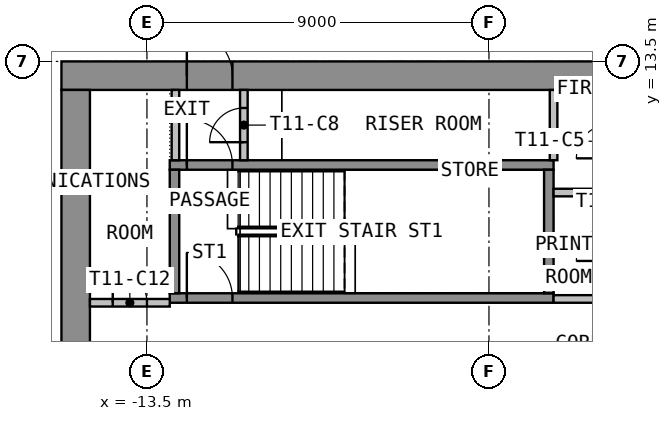
"""IFC4 building model, lengths in metres.
Left out: names, types, materials, properties, quantities, classifications, styles, units other than length and angle.
Written with IfcOpenShell. Run it as: python <this file> out.ifc"""

import sys

from ifc_helpers import new_model, si_unit, direction, frame, frame_2d, origin, place, context, subcontext, project, spatial, rectangle, extrude, element, fill, save


model = new_model("IFC4")
c1 = context("Model", 3, precision=1e-05, world=origin(), true_north=direction((0.0, 1.0)))
c2 = subcontext(c1, "Body", "Model", "MODEL_VIEW")
j1 = project(units=[si_unit("LENGTHUNIT", "METRE"), si_unit("PLANEANGLEUNIT", "RADIAN")], contexts=[c1])
p1 = place(None, origin())
s1 = spatial("IfcSite", under=j1, at=p1, CompositionType="ELEMENT")
p2 = place(p1, origin())
s2 = spatial("IfcBuilding", under=s1, at=p2, CompositionType="ELEMENT")
p3 = place(p2, frame((0.0, 0.0, 156.0)))
s3 = spatial("IfcBuildingStorey", under=s2, at=p3, CompositionType="ELEMENT", Elevation=156.0)
p4 = place(p3, frame((-15.75, 13.125, 0.0), z_axis=(0.0, 0.0, 1.0), x_axis=(1.0, 0.0, 0.0)))
e1 = element("IfcWall", 1, at=p4, inside=s3, PredefinedType="SHEAR", context=c2, shape_type="SweptSolid", body=[
    extrude(rectangle(XDim=31.5, YDim=0.75, at=frame_2d((15.75, 0.0))), origin(), (0.0, 0.0, 1.0), 3.575),
])
p5 = place(p4, frame((14.55, 0.0, 0.0)))
e2 = element("IfcOpeningElement", 2, at=p5, cuts=e1, PredefinedType="OPENING", context=c2, shape_type="SweptSolid", body=[
    extrude(rectangle(XDim=2.4, YDim=2.1, at=frame_2d((1.2, 1.05))), frame((0.0, 0.385, 0.0), z_axis=(0.0, -1.0, 0.0), x_axis=(1.0, 0.0, 0.0)), (0.0, 0.0, 1.0), 0.77),
])
p6 = place(p4, frame((3.3, 0.0, 0.0)))
e3 = element("IfcOpeningElement", 3, at=p6, cuts=e1, PredefinedType="OPENING", context=c2, shape_type="SweptSolid", body=[
    extrude(rectangle(XDim=1.2, YDim=2.1, at=frame_2d((0.6, 1.05))), frame((0.0, 0.385, 0.0), z_axis=(0.0, -1.0, 0.0), x_axis=(1.0, 0.0, 0.0)), (0.0, 0.0, 1.0), 0.77),
])
p7 = place(p4, frame((27.0, 0.0, 0.0)))
e4 = element("IfcOpeningElement", 4, at=p7, cuts=e1, PredefinedType="OPENING", context=c2, shape_type="SweptSolid", body=[
    extrude(rectangle(XDim=1.2, YDim=2.1, at=frame_2d((0.6, 1.05))), frame((0.0, 0.385, 0.0), z_axis=(0.0, -1.0, 0.0), x_axis=(1.0, 0.0, 0.0)), (0.0, 0.0, 1.0), 0.77),
])
p8 = place(p3, frame((-15.375, -12.75, 0.0), z_axis=(0.0, 0.0, 1.0), x_axis=(0.0, 1.0, 0.0)))
e5 = element("IfcWall", 5, at=p8, inside=s3, PredefinedType="SHEAR", context=c2, shape_type="SweptSolid", body=[
    extrude(rectangle(XDim=25.5, YDim=0.75, at=frame_2d((12.75, 0.0))), origin(), (0.0, 0.0, 1.0), 3.575),
])
p9 = place(p8, frame((11.55, 0.0, 0.0)))
e6 = element("IfcOpeningElement", 6, at=p9, cuts=e5, PredefinedType="OPENING", context=c2, shape_type="SweptSolid", body=[
    extrude(rectangle(XDim=2.4, YDim=2.1, at=frame_2d((1.2, 1.05))), frame((0.0, 0.385, 0.0), z_axis=(0.0, -1.0, 0.0), x_axis=(1.0, 0.0, 0.0)), (0.0, 0.0, 1.0), 0.77),
])
p10 = place(p3, frame((-12.9, 7.275, 0.0), z_axis=(0.0, 0.0, 1.0), x_axis=(1.0, 0.0, 0.0)))
e7 = element("IfcWall", 7, at=p10, inside=s3, PredefinedType="SHEAR", context=c2, shape_type="SweptSolid", body=[
    extrude(rectangle(XDim=10.1, YDim=0.25, at=frame_2d((5.05, 0.0))), origin(), (0.0, 0.0, 1.0), 3.575),
])
p11 = place(p10, frame((0.45, 0.0, 0.0)))
e8 = element("IfcOpeningElement", 8, at=p11, cuts=e7, PredefinedType="OPENING", context=c2, shape_type="SweptSolid", body=[
    extrude(rectangle(XDim=1.2, YDim=2.1, at=frame_2d((0.6, 1.05))), frame((0.0, 0.135, 0.0), z_axis=(0.0, -1.0, 0.0), x_axis=(1.0, 0.0, 0.0)), (0.0, 0.0, 1.0), 0.27),
])
p12 = place(p3, frame((-12.9, 10.775, 0.0), z_axis=(0.0, 0.0, 1.0), x_axis=(1.0, 0.0, 0.0)))
e9 = element("IfcWall", 9, at=p12, inside=s3, PredefinedType="SHEAR", context=c2, shape_type="SweptSolid", body=[
    extrude(rectangle(XDim=10.1, YDim=0.25, at=frame_2d((5.05, 0.0))), origin(), (0.0, 0.0, 1.0), 3.575),
])
p13 = place(p12, frame((0.45, 0.0, 0.0)))
e10 = element("IfcOpeningElement", 10, at=p13, cuts=e9, PredefinedType="OPENING", context=c2, shape_type="SweptSolid", body=[
    extrude(rectangle(XDim=1.2, YDim=2.1, at=frame_2d((0.6, 1.05))), frame((0.0, 0.135, 0.0), z_axis=(0.0, -1.0, 0.0), x_axis=(1.0, 0.0, 0.0)), (0.0, 0.0, 1.0), 0.27),
])
for number, where, z_axis, x_axis in (
    (11, (-12.775, 7.4, 0.0), (0.0, 0.0, 1.0), (0.0, 1.0, 0.0)),
    (12, (-2.925, 7.4, 0.0), (0.0, 0.0, 1.0), (0.0, 1.0, 0.0)),
):
    element("IfcWall", number, at=place(p3, frame(where, z_axis=z_axis, x_axis=x_axis)), inside=s3, PredefinedType="SHEAR", context=c2, shape_type="SweptSolid", body=[
        extrude(rectangle(XDim=3.25, YDim=0.25, at=frame_2d((1.625, 0.0))), origin(), (0.0, 0.0, 1.0), 3.575),
    ])
for number, where, z_axis, x_axis in (
    (13, (-2.8, 7.25, 0.0), (0.0, 0.0, 1.0), (1.0, 0.0, 0.0)),
    (14, (-2.8, 10.05, 0.0), (0.0, 0.0, 1.0), (1.0, 0.0, 0.0)),
):
    element("IfcWall", number, at=place(p3, frame(where, z_axis=z_axis, x_axis=x_axis)), inside=s3, PredefinedType="PARTITIONING", context=c2, shape_type="SweptSolid", body=[
        extrude(rectangle(XDim=1.4, YDim=0.2, at=frame_2d((0.7, 0.0))), origin(), (0.0, 0.0, 1.0), 3.575),
    ])
p14 = place(p3, frame((-12.75, 10.9, 0.0), z_axis=(0.0, 0.0, 1.0), x_axis=(0.0, 1.0, 0.0)))
e15 = element("IfcWall", 15, at=p14, inside=s3, PredefinedType="PARTITIONING", context=c2, shape_type="SweptSolid", body=[
    extrude(rectangle(XDim=1.85, YDim=0.2, at=frame_2d((0.925, 0.0))), origin(), (0.0, 0.0, 1.0), 3.575),
])
p15 = place(p3, frame((-10.95, 10.9, 0.0), z_axis=(0.0, 0.0, 1.0), x_axis=(0.0, 1.0, 0.0)))
e16 = element("IfcWall", 16, at=p15, inside=s3, PredefinedType="PARTITIONING", context=c2, shape_type="SweptSolid", body=[
    extrude(rectangle(XDim=1.85, YDim=0.2, at=frame_2d((0.925, 0.0))), origin(), (0.0, 0.0, 1.0), 3.575),
])
p16 = place(p15, frame((0.475, 0.0, 0.0)))
e17 = element("IfcOpeningElement", 17, at=p16, cuts=e16, PredefinedType="OPENING", context=c2, shape_type="SweptSolid", body=[
    extrude(rectangle(XDim=0.9, YDim=2.1, at=frame_2d((0.45, 1.05))), frame((0.0, 0.11, 0.0), z_axis=(0.0, -1.0, 0.0), x_axis=(1.0, 0.0, 0.0)), (0.0, 0.0, 1.0), 0.22),
])
p17 = place(p3, frame((-15.0, 7.15, 0.0), z_axis=(0.0, 0.0, 1.0), x_axis=(1.0, 0.0, 0.0)))
e18 = element("IfcWall", 18, at=p17, inside=s3, PredefinedType="PARTITIONING", context=c2, shape_type="SweptSolid", body=[
    extrude(rectangle(XDim=2.1, YDim=0.2, at=frame_2d((1.05, 0.0))), origin(), (0.0, 0.0, 1.0), 3.575),
])
p18 = place(p17, frame((0.6, 0.0, 0.0)))
e19 = element("IfcOpeningElement", 19, at=p18, cuts=e18, PredefinedType="OPENING", context=c2, shape_type="SweptSolid", body=[
    extrude(rectangle(XDim=0.9, YDim=2.1, at=frame_2d((0.45, 1.05))), frame((0.0, 0.11, 0.0), z_axis=(0.0, -1.0, 0.0), x_axis=(1.0, 0.0, 0.0)), (0.0, 0.0, 1.0), 0.22),
])
p19 = place(p3, frame((-2.8, 10.901, 0.0), z_axis=(0.0, 0.0, 1.0), x_axis=(0.0, 1.0, 0.0)))
e20 = element("IfcWall", 20, at=p19, inside=s3, PredefinedType="PARTITIONING", context=c2, shape_type="SweptSolid", body=[
    extrude(rectangle(XDim=1.848, YDim=0.2, at=frame_2d((0.924, 0.0))), origin(), (0.0, 0.0, 1.0), 3.575),
])
p20 = place(p6, origin())
e21 = element("IfcDoor", 21, at=p20, inside=s3, OperationType="SINGLE_SWING_RIGHT", PredefinedType="DOOR", context=c2, shape_type="SweptSolid", body=[
    extrude(rectangle(XDim=1.2, YDim=2.1, at=frame_2d((0.6, 1.05))), frame((0.0, 0.025, 0.0), z_axis=(0.0, -1.0, 0.0), x_axis=(1.0, 0.0, 0.0)), (0.0, 0.0, 1.0), 0.05),
])
fill(e3, e21)
p21 = place(p11, origin())
e22 = element("IfcDoor", 22, at=p21, inside=s3, OperationType="SINGLE_SWING_LEFT", PredefinedType="DOOR", context=c2, shape_type="SweptSolid", body=[
    extrude(rectangle(XDim=1.2, YDim=2.1, at=frame_2d((0.6, 1.05))), frame((0.0, 0.025, 0.0), z_axis=(0.0, -1.0, 0.0), x_axis=(1.0, 0.0, 0.0)), (0.0, 0.0, 1.0), 0.05),
])
fill(e8, e22)
p22 = place(p13, origin())
e23 = element("IfcDoor", 23, at=p22, inside=s3, OperationType="SINGLE_SWING_RIGHT", PredefinedType="DOOR", context=c2, shape_type="SweptSolid", body=[
    extrude(rectangle(XDim=1.2, YDim=2.1, at=frame_2d((0.6, 1.05))), frame((0.0, 0.025, 0.0), z_axis=(0.0, -1.0, 0.0), x_axis=(1.0, 0.0, 0.0)), (0.0, 0.0, 1.0), 0.05),
])
fill(e10, e23)
p23 = place(p16, origin())
e24 = element("IfcDoor", 24, at=p23, inside=s3, OperationType="SINGLE_SWING_LEFT", PredefinedType="DOOR", context=c2, shape_type="SweptSolid", body=[
    extrude(rectangle(XDim=0.9, YDim=2.1, at=frame_2d((0.45, 1.05))), frame((0.0, 0.025, 0.0), z_axis=(0.0, -1.0, 0.0), x_axis=(1.0, 0.0, 0.0)), (0.0, 0.0, 1.0), 0.05),
])
fill(e17, e24)
p24 = place(p18, origin())
e25 = element("IfcDoor", 25, at=p24, inside=s3, OperationType="SINGLE_SWING_LEFT", PredefinedType="DOOR", context=c2, shape_type="SweptSolid", body=[
    extrude(rectangle(XDim=0.9, YDim=2.1, at=frame_2d((0.45, 1.05))), frame((0.0, 0.025, 0.0), z_axis=(0.0, -1.0, 0.0), x_axis=(1.0, 0.0, 0.0)), (0.0, 0.0, 1.0), 0.05),
])
fill(e19, e25)
save(model, sys.argv[1])
